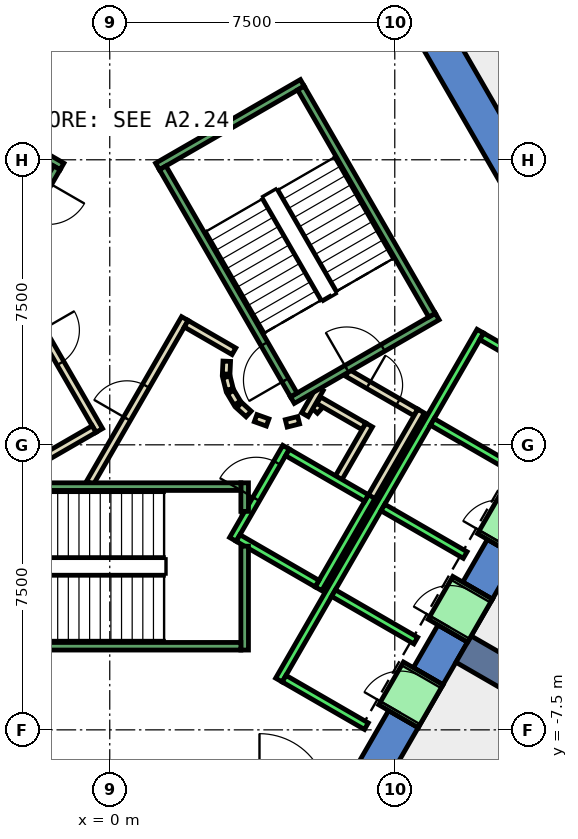
"""IFC4 building model, lengths in metres.
Left out: names, types, materials, properties, quantities, classifications, styles, units other than length and angle.
Written with IfcOpenShell. Run it as: python <this file> out.ifc"""

import sys

from ifc_helpers import new_model, si_unit, direction, frame, frame_2d, origin, place, context, subcontext, project, spatial, polyline, rectangle, outline, extrude, element, fill, save


model = new_model("IFC4")
c1 = context("Model", 3, precision=1e-05, world=origin(), true_north=direction((0.0, 1.0)))
c2 = subcontext(c1, "Body", "Model", "MODEL_VIEW")
j1 = project(units=[si_unit("LENGTHUNIT", "METRE"), si_unit("PLANEANGLEUNIT", "RADIAN")], contexts=[c1])
p1 = place(None, origin())
s1 = spatial("IfcSite", under=j1, at=p1, CompositionType="ELEMENT")
p2 = place(p1, origin())
s2 = spatial("IfcBuilding", under=s1, at=p2, CompositionType="ELEMENT")
p3 = place(p2, frame((0.0, 0.0, 116.0)))
s3 = spatial("IfcBuildingStorey", under=s2, at=p3, CompositionType="ELEMENT", Elevation=116.0)
p4 = place(p3, frame((0.0, 0.0, -0.4)))
e1 = element("IfcWall", 1, at=p4, inside=s3, PredefinedType="SHEAR", context=c2, shape_type="SweptSolid", body=[
    extrude(outline(polyline([(8.517, 11.748), (7.738, 11.298), (12.817, 2.5), (13.856, 2.5), (8.517, 11.748)])), origin(), (0.0, 0.0, 1.0), 4.2),
])
p5 = place(p3, frame((0.0, 0.0, -0.4)))
e2 = element("IfcWall", 2, at=p5, inside=s3, PredefinedType="SHEAR", context=c2, shape_type="SweptSolid", body=[
    extrude(outline(polyline([(8.117, -7.44), (7.338, -6.99), (6.409, -8.6), (6.928, -9.5), (8.117, -7.44)])), origin(), (0.0, 0.0, 1.0), 4.2),
])
p6 = place(p3, frame((0.0, 0.0, -0.4)))
e3 = element("IfcWall", 3, at=p6, inside=s3, PredefinedType="SHEAR", context=c2, shape_type="SweptSolid", body=[
    extrude(outline(polyline([(9.417, -5.189), (8.638, -4.739), (7.988, -5.864), (8.767, -6.314), (9.417, -5.189)])), origin(), (0.0, 0.0, 1.0), 4.2),
])
p7 = place(p3, frame((0.0, 0.0, -0.4)))
e4 = element("IfcWall", 4, at=p7, inside=s3, PredefinedType="SHEAR", context=c2, shape_type="SweptSolid", body=[
    extrude(outline(polyline([(10.717, -2.937), (9.938, -2.487), (9.288, -3.613), (10.067, -4.063), (10.717, -2.937)])), origin(), (0.0, 0.0, 1.0), 4.2),
])
p8 = place(p3, frame((0.0, 0.0, 3.6)))
e5 = element("IfcWall", 5, at=p8, inside=s3, PredefinedType="SHEAR", context=c2, shape_type="SweptSolid", body=[
    extrude(outline(polyline([(8.767, -6.314), (7.988, -5.864), (7.338, -6.99), (8.117, -7.44), (8.767, -6.314)])), origin(), (0.0, 0.0, 1.0), 0.2),
])
p9 = place(p3, frame((0.0, 0.0, 3.6)))
e6 = element("IfcWall", 6, at=p9, inside=s3, PredefinedType="SHEAR", context=c2, shape_type="SweptSolid", body=[
    extrude(outline(polyline([(10.067, -4.063), (9.288, -3.613), (8.638, -4.739), (9.417, -5.189), (10.067, -4.063)])), origin(), (0.0, 0.0, 1.0), 0.2),
])
p10 = place(p3, frame((0.0, 0.0, 3.6)))
e7 = element("IfcWall", 7, at=p10, inside=s3, PredefinedType="SHEAR", context=c2, shape_type="SweptSolid", body=[
    extrude(outline(polyline([(11.367, -1.811), (10.588, -1.361), (9.938, -2.487), (10.717, -2.937), (11.367, -1.811)])), origin(), (0.0, 0.0, 1.0), 0.2),
])
p11 = place(p3, frame((9.31, -5.375, -0.4), z_axis=(0.0, 0.0, 1.0), x_axis=(0.866017533419, -0.500013631625, 0.0)))
e8 = element("IfcWall", 8, at=p11, inside=s3, PredefinedType="SHEAR", context=c2, shape_type="SweptSolid", body=[
    extrude(rectangle(XDim=9.0, YDim=0.8, at=frame_2d((4.5, 0.0))), origin(), (0.0, 0.0, 1.0), 4.2),
])
p12 = place(p3, frame((5.39, 0.898, 0.0), z_axis=(0.0, 0.0, 1.0), x_axis=(0.673828488714, 0.738887791073, 0.0)))
e9 = element("IfcWall", 9, at=p12, inside=s3, PredefinedType="PARTITIONING", context=c2, shape_type="SweptSolid", body=[
    extrude(rectangle(XDim=0.263, YDim=0.2, at=frame_2d((0.131, 0.0))), origin(), (0.0, 0.0, 1.0), 3.8),
])
p13 = place(p3, frame((5.499, 1.172, 0.0), z_axis=(0.0, 0.0, 1.0), x_axis=(0.866333505267, -0.499465972466, 0.0)))
e10 = element("IfcWall", 10, at=p13, inside=s3, PredefinedType="PARTITIONING", context=c2, shape_type="SweptSolid", body=[
    extrude(rectangle(XDim=1.374, YDim=0.2, at=frame_2d((0.687, 0.0))), origin(), (0.0, 0.0, 1.0), 3.8),
])
p14 = place(p3, frame((6.826, 0.522, 0.0), z_axis=(0.0, 0.0, 1.0), x_axis=(-0.500016722714, -0.866015748706, 0.0)))
e11 = element("IfcWall", 11, at=p14, inside=s3, PredefinedType="PARTITIONING", context=c2, shape_type="SweptSolid", body=[
    extrude(rectangle(XDim=1.7, YDim=0.2, at=frame_2d((0.85, 0.0))), origin(), (0.0, 0.0, 1.0), 3.8),
])
p15 = place(p3, frame((6.25, 1.894, 0.0), z_axis=(0.0, 0.0, 1.0), x_axis=(0.866043184279, -0.499969202016, 0.0)))
e12 = element("IfcWall", 12, at=p15, inside=s3, PredefinedType="PARTITIONING", context=c2, shape_type="SweptSolid", body=[
    extrude(rectangle(XDim=2.084, YDim=0.2, at=frame_2d((1.042, 0.0))), origin(), (0.0, 0.0, 1.0), 3.8),
])
p16 = place(p15, frame((0.642, 0.0, 0.0)))
e13 = element("IfcOpeningElement", 13, at=p16, cuts=e12, PredefinedType="OPENING", context=c2, shape_type="SweptSolid", body=[
    extrude(rectangle(XDim=0.9, YDim=2.1, at=frame_2d((0.45, 1.05))), frame((0.0, 0.11, 0.0), z_axis=(0.0, -1.0, 0.0), x_axis=(1.0, 0.0, 0.0)), (0.0, 0.0, 1.0), 0.22),
])
p17 = place(p3, frame((8.192, 0.888, 0.0), z_axis=(0.0, 0.0, 1.0), x_axis=(-0.499940625693, -0.866059680843, 0.0)))
e14 = element("IfcWall", 14, at=p17, inside=s3, PredefinedType="PARTITIONING", context=c2, shape_type="SweptSolid", body=[
    extrude(rectangle(XDim=2.68, YDim=0.2, at=frame_2d((1.34, 0.0))), origin(), (0.0, 0.0, 1.0), 3.8),
])
p18 = place(p3, frame((5.135, 0.793, 0.0), z_axis=(0.0, 0.0, 1.0), x_axis=(0.499526442893, 0.866298639529, 0.0)))
e15 = element("IfcWall", 15, at=p18, inside=s3, PredefinedType="PARTITIONING", context=c2, shape_type="SweptSolid", body=[
    extrude(rectangle(XDim=0.791, YDim=0.2, at=frame_2d((0.396, 0.0))), origin(), (0.0, 0.0, 1.0), 3.8),
])
p19 = place(p3, frame((-0.52, -1.0, 0.0), z_axis=(0.0, 0.0, 1.0), x_axis=(0.50011622646, 0.865958290007, 0.0)))
e16 = element("IfcWall", 16, at=p19, inside=s3, PredefinedType="PARTITIONING", context=c2, shape_type="SweptSolid", body=[
    extrude(rectangle(XDim=4.991, YDim=0.2, at=frame_2d((2.496, 0.0))), origin(), (0.0, 0.0, 1.0), 3.8),
])
p20 = place(p19, frame((1.945, 0.0, 0.0)))
e17 = element("IfcOpeningElement", 17, at=p20, cuts=e16, PredefinedType="OPENING", context=c2, shape_type="SweptSolid", body=[
    extrude(rectangle(XDim=1.0, YDim=2.1, at=frame_2d((0.5, 1.05))), frame((0.0, 0.11, 0.0), z_axis=(0.0, -1.0, 0.0), x_axis=(1.0, 0.0, 0.0)), (0.0, 0.0, 1.0), 0.22),
])
p21 = place(p3, frame((2.012, 3.186, 0.0), z_axis=(0.0, 0.0, 1.0), x_axis=(0.865891012941, -0.500232699559, 0.0)))
e18 = element("IfcWall", 18, at=p21, inside=s3, PredefinedType="PARTITIONING", context=c2, shape_type="SweptSolid", body=[
    extrude(rectangle(XDim=1.449, YDim=0.2, at=frame_2d((0.725, 0.0))), origin(), (0.0, 0.0, 1.0), 3.8),
])
p22 = place(p3, frame((3.079, 2.199, 0.0), z_axis=(0.0, 0.0, 1.0), x_axis=(-0.047771483479, -0.998858290933, 0.0)))
e19 = element("IfcWall", 19, at=p22, inside=s3, PredefinedType="PARTITIONING", context=c2, shape_type="SweptSolid", body=[
    extrude(rectangle(XDim=0.337, YDim=0.2, at=frame_2d((0.169, 0.0))), origin(), (0.0, 0.0, 1.0), 3.8),
])
p23 = place(p3, frame((3.07, 1.786, 0.0), z_axis=(0.0, 0.0, 1.0), x_axis=(0.242705583207, -0.970099994784, 0.0)))
e20 = element("IfcWall", 20, at=p23, inside=s3, PredefinedType="PARTITIONING", context=c2, shape_type="SweptSolid", body=[
    extrude(rectangle(XDim=0.338, YDim=0.2, at=frame_2d((0.169, 0.0))), origin(), (0.0, 0.0, 1.0), 3.8),
])
for number, where, z_axis, x_axis in (
    (21, (3.182, 1.388, 0.0), (0.0, 0.0, 1.0), (0.512, -0.859, 0.0)),
    (22, (3.404, 1.039, 0.0), (0.0, 0.0, 1.0), (0.74, -0.672, 0.0)),
):
    element("IfcWall", number, at=place(p3, frame(where, z_axis=z_axis, x_axis=x_axis)), inside=s3, PredefinedType="PARTITIONING", context=c2, shape_type="SweptSolid", body=[
        extrude(rectangle(XDim=0.338, YDim=0.2, at=frame_2d((0.169, 0.0))), origin(), (0.0, 0.0, 1.0), 3.8),
    ])
p24 = place(p3, frame((3.838, 0.702, 0.0), z_axis=(0.0, 0.0, 1.0), x_axis=(0.941035081519, -0.338308993895, 0.0)))
e23 = element("IfcWall", 23, at=p24, inside=s3, PredefinedType="PARTITIONING", context=c2, shape_type="SweptSolid", body=[
    extrude(rectangle(XDim=0.337, YDim=0.2, at=frame_2d((0.168, 0.0))), origin(), (0.0, 0.0, 1.0), 3.8),
])
p25 = place(p3, frame((4.644, 0.564, 0.0), z_axis=(0.0, 0.0, 1.0), x_axis=(0.969929076366, 0.243387729394, 0.0)))
e24 = element("IfcWall", 24, at=p25, inside=s3, PredefinedType="PARTITIONING", context=c2, shape_type="SweptSolid", body=[
    extrude(rectangle(XDim=0.337, YDim=0.2, at=frame_2d((0.168, 0.0))), origin(), (0.0, 0.0, 1.0), 3.8),
])
p26 = place(p3, frame((-2.771, 4.7, 0.0), z_axis=(0.0, 0.0, 1.0), x_axis=(0.499969479948, -0.866043023828, 0.0)))
e25 = element("IfcWall", 25, at=p26, inside=s3, PredefinedType="PARTITIONING", context=c2, shape_type="SweptSolid", body=[
    extrude(rectangle(XDim=4.99, YDim=0.2, at=frame_2d((2.495, 0.0))), origin(), (0.0, 0.0, 1.0), 3.8),
])
p27 = place(p26, frame((1.945, 0.0, 0.0)))
e26 = element("IfcOpeningElement", 26, at=p27, cuts=e25, PredefinedType="OPENING", context=c2, shape_type="SweptSolid", body=[
    extrude(rectangle(XDim=1.0, YDim=2.1, at=frame_2d((0.5, 1.05))), frame((0.0, 0.11, 0.0), z_axis=(0.0, -1.0, 0.0), x_axis=(1.0, 0.0, 0.0)), (0.0, 0.0, 1.0), 0.22),
])
p28 = place(p3, frame((-0.412, 0.414, 0.0), z_axis=(0.0, 0.0, 1.0), x_axis=(-0.866017369001, -0.500013916395, 0.0)))
e27 = element("IfcWall", 27, at=p28, inside=s3, PredefinedType="PARTITIONING", context=c2, shape_type="SweptSolid", body=[
    extrude(rectangle(XDim=1.45, YDim=0.2, at=frame_2d((0.725, 0.0))), origin(), (0.0, 0.0, 1.0), 3.8),
])
p29 = place(p3, frame((12.401, -7.621, 0.0), z_axis=(0.0, 0.0, 1.0), x_axis=(-0.499983724212, -0.866034800411, 0.0)))
e28 = element("IfcWall", 28, at=p29, inside=s3, PredefinedType="PARTITIONING", context=c2, shape_type="SweptSolid", body=[
    extrude(rectangle(XDim=9.302, YDim=0.2, at=frame_2d((4.651, 0.0))), origin(), (0.0, 0.0, 1.0), 3.8),
])
p30 = place(p3, frame((3.24, -2.488, 0.0), z_axis=(0.0, 0.0, 1.0), x_axis=(0.49994636267, 0.866056369097, 0.0)))
e29 = element("IfcWall", 29, at=p30, inside=s3, PredefinedType="STANDARD", context=c2, shape_type="SweptSolid", body=[
    extrude(rectangle(XDim=2.8, YDim=0.2, at=frame_2d((1.4, 0.0))), origin(), (0.0, 0.0, 1.0), 3.8),
])
p31 = place(p30, frame((1.225, 0.0, 0.0)))
e30 = element("IfcOpeningElement", 30, at=p31, cuts=e29, PredefinedType="OPENING", context=c2, shape_type="SweptSolid", body=[
    extrude(rectangle(XDim=1.1, YDim=2.1, at=frame_2d((0.55, 1.05))), frame((0.0, 0.11, 0.0), z_axis=(0.0, -1.0, 0.0), x_axis=(1.0, 0.0, 0.0)), (0.0, 0.0, 1.0), 0.22),
])
p32 = place(p3, frame((5.492, -3.788, 0.0), z_axis=(0.0, 0.0, 1.0), x_axis=(0.500011755427, 0.866018616679, 0.0)))
e31 = element("IfcWall", 31, at=p32, inside=s3, PredefinedType="STANDARD", context=c2, shape_type="SweptSolid", body=[
    extrude(rectangle(XDim=2.8, YDim=0.2, at=frame_2d((1.4, 0.0))), origin(), (0.0, 0.0, 1.0), 3.8),
])
p33 = place(p3, frame((3.377, -2.452, 0.0), z_axis=(0.0, 0.0, 1.0), x_axis=(0.865955154139, -0.50012165622, 0.0)))
e32 = element("IfcWall", 32, at=p33, inside=s3, PredefinedType="STANDARD", context=c2, shape_type="SweptSolid", body=[
    extrude(rectangle(XDim=2.4, YDim=0.2, at=frame_2d((1.2, 0.0))), origin(), (0.0, 0.0, 1.0), 3.8),
])
p34 = place(p3, frame((4.677, -0.2, 0.0), z_axis=(0.0, 0.0, 1.0), x_axis=(0.865973769406, -0.500089422704, 0.0)))
e33 = element("IfcWall", 33, at=p34, inside=s3, PredefinedType="STANDARD", context=c2, shape_type="SweptSolid", body=[
    extrude(rectangle(XDim=2.399, YDim=0.2, at=frame_2d((1.2, 0.0))), origin(), (0.0, 0.0, 1.0), 3.8),
])
p35 = place(p3, frame((4.451, -6.19, 0.0), z_axis=(0.0, 0.0, 1.0), x_axis=(0.50000090737, 0.866024879913, 0.0)))
e34 = element("IfcWall", 34, at=p35, inside=s3, PredefinedType="STANDARD", context=c2, shape_type="SweptSolid", body=[
    extrude(rectangle(XDim=10.6, YDim=0.2, at=frame_2d((5.3, 0.0))), origin(), (0.0, 0.0, 1.0), 3.8),
])
for number, where, z_axis, x_axis in (
    (35, (4.588, -6.153, 0.0), (0.0, 0.0, 1.0), (0.866, -0.5, 0.0)),
    (36, (5.888, -3.902, 0.0), (0.0, 0.0, 1.0), (0.866, -0.5, 0.0)),
    (37, (7.188, -1.65, 0.0), (0.0, 0.0, 1.0), (0.866, -0.5, 0.0)),
    (38, (8.488, 0.602, 0.0), (0.0, 0.0, 1.0), (0.866, -0.5, 0.0)),
):
    element("IfcWall", number, at=place(p3, frame(where, z_axis=z_axis, x_axis=x_axis)), inside=s3, PredefinedType="STANDARD", context=c2, shape_type="SweptSolid", body=[
        extrude(rectangle(XDim=2.5, YDim=0.2, at=frame_2d((1.25, 0.0))), origin(), (0.0, 0.0, 1.0), 3.8),
    ])
p36 = place(p3, frame((9.788, 2.853, 0.0), z_axis=(0.0, 0.0, 1.0), x_axis=(0.865998541277, -0.500046524342, 0.0)))
e39 = element("IfcWall", 39, at=p36, inside=s3, PredefinedType="STANDARD", context=c2, shape_type="SweptSolid", body=[
    extrude(rectangle(XDim=2.5, YDim=0.2, at=frame_2d((1.25, 0.0))), origin(), (0.0, 0.0, 1.0), 3.8),
])
p37 = place(p3, frame((7.598, -7.14, 0.0), z_axis=(0.0, 0.0, 1.0), x_axis=(0.500362116554, 0.865816234728, 0.0)))
e40 = element("IfcWall", 40, at=p37, inside=s3, PredefinedType="STANDARD", context=c2, shape_type="SweptSolid", body=[
    extrude(rectangle(XDim=1.299, YDim=1.2, at=frame_2d((0.65, 0.0))), origin(), (0.0, 0.0, 1.0), 2.4),
])
p38 = place(p37, frame((0.1, 0.0, 0.0)))
e41 = element("IfcOpeningElement", 41, at=p38, cuts=e40, PredefinedType="OPENING", context=c2, shape_type="SweptSolid", body=[
    extrude(rectangle(XDim=1.1, YDim=2.3, at=frame_2d((0.55, 1.15))), frame((0.0, 0.61, 0.0), z_axis=(0.0, -1.0, 0.0), x_axis=(1.0, 0.0, 0.0)), (0.0, 0.0, 1.0), 1.22),
])
p39 = place(p3, frame((8.898, -4.889, 0.0), z_axis=(0.0, 0.0, 1.0), x_axis=(0.500036693733, 0.866004217611, 0.0)))
e42 = element("IfcWall", 42, at=p39, inside=s3, PredefinedType="STANDARD", context=c2, shape_type="SweptSolid", body=[
    extrude(rectangle(XDim=1.3, YDim=1.2, at=frame_2d((0.65, 0.0))), origin(), (0.0, 0.0, 1.0), 2.4),
])
p40 = place(p39, frame((0.1, 0.0, 0.0)))
e43 = element("IfcOpeningElement", 43, at=p40, cuts=e42, PredefinedType="OPENING", context=c2, shape_type="SweptSolid", body=[
    extrude(rectangle(XDim=1.1, YDim=2.3, at=frame_2d((0.55, 1.15))), frame((0.0, 0.61, 0.0), z_axis=(0.0, -1.0, 0.0), x_axis=(1.0, 0.0, 0.0)), (0.0, 0.0, 1.0), 1.22),
])
p41 = place(p3, frame((10.198, -2.637, 0.0), z_axis=(0.0, 0.0, 1.0), x_axis=(0.49989585183, 0.866085525409, 0.0)))
e44 = element("IfcWall", 44, at=p41, inside=s3, PredefinedType="STANDARD", context=c2, shape_type="SweptSolid", body=[
    extrude(rectangle(XDim=1.3, YDim=1.2, at=frame_2d((0.65, 0.0))), origin(), (0.0, 0.0, 1.0), 2.4),
])
p42 = place(p41, frame((0.1, 0.0, 0.0)))
e45 = element("IfcOpeningElement", 45, at=p42, cuts=e44, PredefinedType="OPENING", context=c2, shape_type="SweptSolid", body=[
    extrude(rectangle(XDim=1.1, YDim=2.3, at=frame_2d((0.55, 1.15))), frame((0.0, 0.61, 0.0), z_axis=(0.0, -1.0, 0.0), x_axis=(1.0, 0.0, 0.0)), (0.0, 0.0, 1.0), 1.22),
])
p43 = place(p3, frame((3.55, -2.667, 0.0), z_axis=(0.0, 0.0, 1.0), x_axis=(0.0, -1.0, 0.0)))
e46 = element("IfcWall", 46, at=p43, inside=s3, PredefinedType="STANDARD", context=c2, shape_type="SweptSolid", body=[
    extrude(rectangle(XDim=2.733, YDim=0.2, at=frame_2d((1.366, 0.0))), origin(), (0.0, 0.0, 1.0), 3.8),
])
p44 = place(p3, frame((3.55, -1.0, 0.0), z_axis=(0.0, 0.0, 1.0), x_axis=(0.0, -1.0, 0.0)))
e47 = element("IfcWall", 47, at=p44, inside=s3, PredefinedType="STANDARD", context=c2, shape_type="SweptSolid", body=[
    extrude(rectangle(XDim=0.751, YDim=0.2, at=frame_2d((0.375, 0.0))), origin(), (0.0, 0.0, 1.0), 3.8),
])
p45 = place(p3, frame((-3.45, -1.1, 0.0), z_axis=(0.0, 0.0, 1.0), x_axis=(1.0, 0.0, 0.0)))
e48 = element("IfcWall", 48, at=p45, inside=s3, PredefinedType="STANDARD", context=c2, shape_type="SweptSolid", body=[
    extrude(rectangle(XDim=6.9, YDim=0.2, at=frame_2d((3.45, 0.0))), origin(), (0.0, 0.0, 1.0), 3.8),
])
p46 = place(p45, frame((0.45, 0.0, 0.0)))
e49 = element("IfcOpeningElement", 49, at=p46, cuts=e48, PredefinedType="OPENING", context=c2, shape_type="SweptSolid", body=[
    extrude(rectangle(XDim=1.1, YDim=2.2, at=frame_2d((0.55, 1.1))), frame((0.0, 0.11, 0.0), z_axis=(0.0, -1.0, 0.0), x_axis=(1.0, 0.0, 0.0)), (0.0, 0.0, 1.0), 0.22),
])
p47 = place(p3, frame((-3.45, -5.3, 0.0), z_axis=(0.0, 0.0, 1.0), x_axis=(1.0, 0.0, 0.0)))
e50 = element("IfcWall", 50, at=p47, inside=s3, PredefinedType="STANDARD", context=c2, shape_type="SweptSolid", body=[
    extrude(rectangle(XDim=6.9, YDim=0.2, at=frame_2d((3.45, 0.0))), origin(), (0.0, 0.0, 1.0), 3.8),
])
p48 = place(p3, frame((4.806, 1.176, 0.0), z_axis=(0.0, 0.0, 1.0), x_axis=(0.866059941101, 0.499940174841, 0.0)))
e51 = element("IfcWall", 51, at=p48, inside=s3, PredefinedType="STANDARD", context=c2, shape_type="SweptSolid", body=[
    extrude(rectangle(XDim=4.4, YDim=0.2, at=frame_2d((2.2, 0.0))), origin(), (0.0, 0.0, 1.0), 3.8),
])
p49 = place(p48, frame((1.65, 0.0, 0.0)))
e52 = element("IfcOpeningElement", 52, at=p49, cuts=e51, PredefinedType="OPENING", context=c2, shape_type="SweptSolid", body=[
    extrude(rectangle(XDim=1.1, YDim=2.2, at=frame_2d((0.55, 1.1))), frame((0.0, 0.11, 0.0), z_axis=(0.0, -1.0, 0.0), x_axis=(1.0, 0.0, 0.0)), (0.0, 0.0, 1.0), 0.22),
])
p50 = place(p3, frame((1.256, 7.324, 0.0), z_axis=(0.0, 0.0, 1.0), x_axis=(0.866046073146, 0.499964197906, 0.0)))
e53 = element("IfcWall", 53, at=p50, inside=s3, PredefinedType="STANDARD", context=c2, shape_type="SweptSolid", body=[
    extrude(rectangle(XDim=4.4, YDim=0.2, at=frame_2d((2.2, 0.0))), origin(), (0.0, 0.0, 1.0), 3.8),
])
p51 = place(p3, frame((4.843, 1.312, 0.0), z_axis=(0.0, 0.0, 1.0), x_axis=(-0.499963383562, 0.866046543262, 0.0)))
e54 = element("IfcWall", 54, at=p51, inside=s3, PredefinedType="STANDARD", context=c2, shape_type="SweptSolid", body=[
    extrude(rectangle(XDim=6.9, YDim=0.2, at=frame_2d((3.45, 0.0))), origin(), (0.0, 0.0, 1.0), 3.8),
])
p52 = place(p51, frame((0.45, 0.0, 0.0)))
e55 = element("IfcOpeningElement", 55, at=p52, cuts=e54, PredefinedType="OPENING", context=c2, shape_type="SweptSolid", body=[
    extrude(rectangle(XDim=1.1, YDim=2.2, at=frame_2d((0.55, 1.1))), frame((0.0, 0.11, 0.0), z_axis=(0.0, -1.0, 0.0), x_axis=(1.0, 0.0, 0.0)), (0.0, 0.0, 1.0), 0.22),
])
p53 = place(p3, frame((8.48, 3.412, 0.0), z_axis=(0.0, 0.0, 1.0), x_axis=(-0.499978703459, 0.866037698999, 0.0)))
e56 = element("IfcWall", 56, at=p53, inside=s3, PredefinedType="STANDARD", context=c2, shape_type="SweptSolid", body=[
    extrude(rectangle(XDim=6.9, YDim=0.2, at=frame_2d((3.45, 0.0))), origin(), (0.0, 0.0, 1.0), 3.8),
])
p54 = place(p3, frame((-1.256, 7.324, 0.0), z_axis=(0.0, 0.0, 1.0), x_axis=(-0.866046073146, 0.499964197906, 0.0)))
e57 = element("IfcWall", 57, at=p54, inside=s3, PredefinedType="STANDARD", context=c2, shape_type="SweptSolid", body=[
    extrude(rectangle(XDim=4.4, YDim=0.2, at=frame_2d((2.2, 0.0))), origin(), (0.0, 0.0, 1.0), 3.8),
])
p55 = place(p54, frame((1.65, 0.0, 0.0)))
e58 = element("IfcOpeningElement", 58, at=p55, cuts=e57, PredefinedType="OPENING", context=c2, shape_type="SweptSolid", body=[
    extrude(rectangle(XDim=1.1, YDim=2.2, at=frame_2d((0.55, 1.1))), frame((0.0, 0.11, 0.0), z_axis=(0.0, -1.0, 0.0), x_axis=(1.0, 0.0, 0.0)), (0.0, 0.0, 1.0), 0.22),
])
p56 = place(p3, frame((-1.393, 7.288, 0.0), z_axis=(0.0, 0.0, 1.0), x_axis=(-0.499963383562, -0.866046543262, 0.0)))
e59 = element("IfcWall", 59, at=p56, inside=s3, PredefinedType="STANDARD", context=c2, shape_type="SweptSolid", body=[
    extrude(rectangle(XDim=6.9, YDim=0.2, at=frame_2d((3.45, 0.0))), origin(), (0.0, 0.0, 1.0), 3.8),
])
p57 = place(p56, frame((0.45, 0.0, 0.0)))
e60 = element("IfcOpeningElement", 60, at=p57, cuts=e59, PredefinedType="OPENING", context=c2, shape_type="SweptSolid", body=[
    extrude(rectangle(XDim=1.1, YDim=2.2, at=frame_2d((0.55, 1.1))), frame((0.0, 0.11, 0.0), z_axis=(0.0, -1.0, 0.0), x_axis=(1.0, 0.0, 0.0)), (0.0, 0.0, 1.0), 0.22),
])
p58 = place(p20, origin())
e61 = element("IfcDoor", 61, at=p58, inside=s3, OperationType="SINGLE_SWING_LEFT", PredefinedType="DOOR", context=c2, shape_type="SweptSolid", body=[
    extrude(rectangle(XDim=1.0, YDim=2.1, at=frame_2d((0.5, 1.05))), frame((0.0, 0.025, 0.0), z_axis=(0.0, -1.0, 0.0), x_axis=(1.0, 0.0, 0.0)), (0.0, 0.0, 1.0), 0.05),
])
fill(e17, e61)
p59 = place(p27, origin())
e62 = element("IfcDoor", 62, at=p59, inside=s3, OperationType="SINGLE_SWING_RIGHT", PredefinedType="DOOR", context=c2, shape_type="SweptSolid", body=[
    extrude(rectangle(XDim=1.0, YDim=2.1, at=frame_2d((0.5, 1.05))), frame((0.0, 0.025, 0.0), z_axis=(0.0, -1.0, 0.0), x_axis=(1.0, 0.0, 0.0)), (0.0, 0.0, 1.0), 0.05),
])
fill(e26, e62)
p60 = place(p16, origin())
e63 = element("IfcDoor", 63, at=p60, inside=s3, OperationType="SINGLE_SWING_LEFT", PredefinedType="DOOR", context=c2, shape_type="SweptSolid", body=[
    extrude(rectangle(XDim=0.9, YDim=2.1, at=frame_2d((0.45, 1.05))), frame((0.0, 0.025, 0.0), z_axis=(0.0, -1.0, 0.0), x_axis=(1.0, 0.0, 0.0)), (0.0, 0.0, 1.0), 0.05),
])
fill(e13, e63)
p61 = place(p38, origin())
e64 = element("IfcDoor", 64, at=p61, inside=s3, OperationType="SLIDING_TO_LEFT", PredefinedType="DOOR", context=c2, shape_type="SweptSolid", body=[
    extrude(rectangle(XDim=1.1, YDim=2.3, at=frame_2d((0.55, 1.15))), frame((0.0, 0.025, 0.0), z_axis=(0.0, -1.0, 0.0), x_axis=(1.0, 0.0, 0.0)), (0.0, 0.0, 1.0), 0.05),
])
fill(e41, e64)
p62 = place(p40, origin())
e65 = element("IfcDoor", 65, at=p62, inside=s3, OperationType="SLIDING_TO_LEFT", PredefinedType="DOOR", context=c2, shape_type="SweptSolid", body=[
    extrude(rectangle(XDim=1.1, YDim=2.3, at=frame_2d((0.55, 1.15))), frame((0.0, 0.025, 0.0), z_axis=(0.0, -1.0, 0.0), x_axis=(1.0, 0.0, 0.0)), (0.0, 0.0, 1.0), 0.05),
])
fill(e43, e65)
p63 = place(p31, origin())
e66 = element("IfcDoor", 66, at=p63, inside=s3, OperationType="SLIDING_TO_LEFT", PredefinedType="DOOR", context=c2, shape_type="SweptSolid", body=[
    extrude(rectangle(XDim=1.1, YDim=2.1, at=frame_2d((0.55, 1.05))), frame((0.0, 0.025, 0.0), z_axis=(0.0, -1.0, 0.0), x_axis=(1.0, 0.0, 0.0)), (0.0, 0.0, 1.0), 0.05),
])
fill(e30, e66)
p64 = place(p52, origin())
e67 = element("IfcDoor", 67, at=p64, inside=s3, OperationType="SINGLE_SWING_LEFT", PredefinedType="DOOR", context=c2, shape_type="SweptSolid", body=[
    extrude(rectangle(XDim=1.1, YDim=2.2, at=frame_2d((0.55, 1.1))), frame((0.0, 0.025, 0.0), z_axis=(0.0, -1.0, 0.0), x_axis=(1.0, 0.0, 0.0)), (0.0, 0.0, 1.0), 0.05),
])
fill(e55, e67)
p65 = place(p49, origin())
e68 = element("IfcDoor", 68, at=p65, inside=s3, OperationType="SINGLE_SWING_LEFT", PredefinedType="DOOR", context=c2, shape_type="SweptSolid", body=[
    extrude(rectangle(XDim=1.1, YDim=2.2, at=frame_2d((0.55, 1.1))), frame((0.0, 0.025, 0.0), z_axis=(0.0, -1.0, 0.0), x_axis=(1.0, 0.0, 0.0)), (0.0, 0.0, 1.0), 0.05),
])
fill(e52, e68)
save(model, sys.argv[1])
